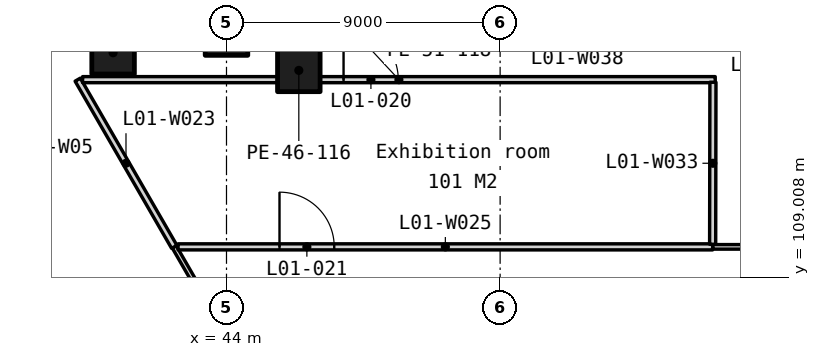
"""IFC4 building model, lengths in metres.
Left out: names, types, materials, properties, quantities, classifications, styles, units other than length and angle.
Written with IfcOpenShell. Run it as: python <this file> out.ifc"""

import sys

from ifc_helpers import new_model, si_unit, direction, frame, frame_2d, origin, origin_2d, place, context, subcontext, project, spatial, rectangle, extrude, element, fill, save


model = new_model("IFC4")
c1 = context("Model", 3, precision=1e-05, world=origin(), true_north=direction((0.0, 1.0)))
c2 = subcontext(c1, "Body", "Model", "MODEL_VIEW")
j1 = project(units=[si_unit("LENGTHUNIT", "METRE"), si_unit("PLANEANGLEUNIT", "RADIAN")], contexts=[c1])
p1 = place(None, origin())
s1 = spatial("IfcSite", under=j1, at=p1, CompositionType="ELEMENT")
p2 = place(p1, origin())
s2 = spatial("IfcBuilding", under=s1, at=p2, CompositionType="ELEMENT")
p3 = place(p2, frame((0.0, 0.0, 7.5)))
s3 = spatial("IfcBuildingStorey", under=s2, at=p3, CompositionType="ELEMENT", Elevation=7.5)
for number, where, z_axis, x_axis in (
    (1, (44.0, 117.0, 0.0), (0.0, 0.0, 1.0), (1.0, 0.0, 0.0)),
    (2, (40.27, 116.385, 0.0), (0.0, 0.0, 1.0), (1.0, 0.0, 0.0)),
    (3, (46.379, 115.805, 0.0), (0.0, 0.0, 1.0), (1.0, 0.0, 0.0)),
):
    element("IfcColumn", number, at=place(p3, frame(where, z_axis=z_axis, x_axis=x_axis)), inside=s3, PredefinedType="COLUMN", context=c2, shape_type="SweptSolid", body=[
        extrude(rectangle(XDim=1.4, YDim=1.4, at=origin_2d()), origin(), (0.0, 0.0, 1.0), 6.0),
    ])
p4 = place(p3, frame((42.282, 110.0, 0.0), z_axis=(0.0, 0.0, 1.0), x_axis=(0.499999730012, -0.866025559662, 0.0)))
e4 = element("IfcWall", 4, at=p4, inside=s3, PredefinedType="PARTITIONING", context=c2, shape_type="SweptSolid", body=[
    extrude(rectangle(XDim=46.188, YDim=0.15, at=frame_2d((23.094, 0.0))), origin(), (0.0, 0.0, 1.0), 5.7),
])
p5 = place(p4, frame((24.383, 0.0, 0.0)))
e5 = element("IfcOpeningElement", 5, at=p5, cuts=e4, PredefinedType="OPENING", context=c2, shape_type="SweptSolid", body=[
    extrude(rectangle(XDim=1.8, YDim=2.1, at=frame_2d((0.9, 1.05))), frame((0.0, 0.085, 0.0), z_axis=(0.0, -1.0, 0.0), x_axis=(1.0, 0.0, 0.0)), (0.0, 0.0, 1.0), 0.17),
])
p6 = place(p3, frame((39.107, 115.5, 0.0), z_axis=(0.0, 0.0, 1.0), x_axis=(0.49998423276, -0.866034506813, 0.0)))
e6 = element("IfcWall", 6, at=p6, inside=s3, PredefinedType="PARTITIONING", context=c2, shape_type="SweptSolid", body=[
    extrude(rectangle(XDim=6.351, YDim=0.2, at=frame_2d((3.175, 0.0))), origin(), (0.0, 0.0, 1.0), 5.7),
])
p7 = place(p3, frame((59.99, 110.0, 0.0), z_axis=(0.0, 0.0, 1.0), x_axis=(1.0, 0.0, 0.0)))
e7 = element("IfcWall", 7, at=p7, inside=s3, PredefinedType="PARTITIONING", context=c2, shape_type="SweptSolid", body=[
    extrude(rectangle(XDim=9.39, YDim=0.15, at=frame_2d((4.695, 0.0))), origin(), (0.0, 0.0, 1.0), 5.7),
])
p8 = place(p3, frame((42.407, 110.0, 0.0), z_axis=(0.0, 0.0, 1.0), x_axis=(1.0, 0.0, 0.0)))
e8 = element("IfcWall", 8, at=p8, inside=s3, PredefinedType="PARTITIONING", context=c2, shape_type="SweptSolid", body=[
    extrude(rectangle(XDim=17.583, YDim=0.2, at=frame_2d((8.792, 0.0))), origin(), (0.0, 0.0, 1.0), 5.7),
])
p9 = place(p8, frame((3.337, 0.0, 0.0)))
e9 = element("IfcOpeningElement", 9, at=p9, cuts=e8, PredefinedType="OPENING", context=c2, shape_type="SweptSolid", body=[
    extrude(rectangle(XDim=1.8, YDim=2.1, at=frame_2d((0.9, 1.05))), frame((0.0, 0.11, 0.0), z_axis=(0.0, -1.0, 0.0), x_axis=(1.0, 0.0, 0.0)), (0.0, 0.0, 1.0), 0.22),
])
p10 = place(p3, frame((39.267, 115.5, 0.0), z_axis=(0.0, 0.0, 1.0), x_axis=(1.0, 0.0, 0.0)))
e10 = element("IfcWall", 10, at=p10, inside=s3, PredefinedType="PARTITIONING", context=c2, shape_type="SweptSolid", body=[
    extrude(rectangle(XDim=20.808, YDim=0.2, at=frame_2d((10.404, 0.0))), origin(), (0.0, 0.0, 1.0), 5.7),
])
p11 = place(p10, frame((8.584, 0.0, 0.0)))
e11 = element("IfcOpeningElement", 11, at=p11, cuts=e10, PredefinedType="OPENING", context=c2, shape_type="SweptSolid", body=[
    extrude(rectangle(XDim=1.8, YDim=2.1, at=frame_2d((0.9, 1.05))), frame((0.0, 0.11, 0.0), z_axis=(0.0, -1.0, 0.0), x_axis=(1.0, 0.0, 0.0)), (0.0, 0.0, 1.0), 0.22),
])
p12 = place(p3, frame((59.99, 110.085, 0.0), z_axis=(0.0, 0.0, 1.0), x_axis=(0.001786365783, 0.999998404447, 0.0)))
e12 = element("IfcWall", 12, at=p12, inside=s3, PredefinedType="PARTITIONING", context=c2, shape_type="SweptSolid", body=[
    extrude(rectangle(XDim=5.33, YDim=0.2, at=frame_2d((2.665, 0.0))), origin(), (0.0, 0.0, 1.0), 5.7),
])
p13 = place(p11, origin())
e13 = element("IfcDoor", 13, at=p13, inside=s3, OperationType="SINGLE_SWING_LEFT", PredefinedType="DOOR", context=c2, shape_type="SweptSolid", body=[
    extrude(rectangle(XDim=1.8, YDim=2.1, at=frame_2d((0.9, 1.05))), frame((0.0, 0.025, 0.0), z_axis=(0.0, -1.0, 0.0), x_axis=(1.0, 0.0, 0.0)), (0.0, 0.0, 1.0), 0.05),
])
fill(e11, e13)
p14 = place(p9, origin())
e14 = element("IfcDoor", 14, at=p14, inside=s3, OperationType="SINGLE_SWING_LEFT", PredefinedType="DOOR", context=c2, shape_type="SweptSolid", body=[
    extrude(rectangle(XDim=1.8, YDim=2.1, at=frame_2d((0.9, 1.05))), frame((0.0, 0.025, 0.0), z_axis=(0.0, -1.0, 0.0), x_axis=(1.0, 0.0, 0.0)), (0.0, 0.0, 1.0), 0.05),
])
fill(e9, e14)
save(model, sys.argv[1])
